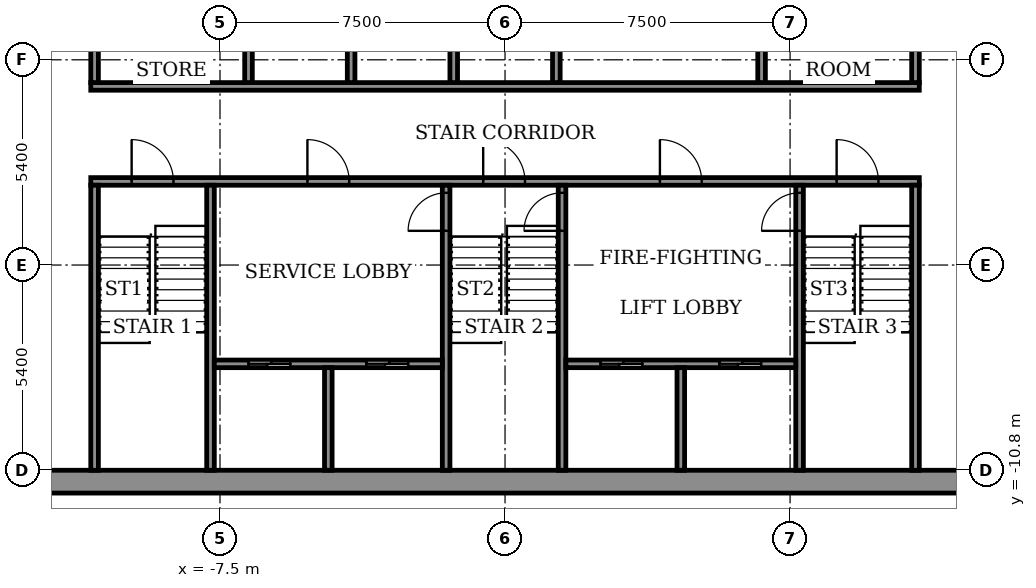
"""IFC4 building model, lengths in metres.
Left out: names, types, materials, properties, quantities, classifications, styles, units other than length and angle.
Written with IfcOpenShell. Run it as: python <this file> out.ifc"""

import sys

from ifc_helpers import new_model, si_unit, direction, frame, frame_2d, origin, place, context, subcontext, project, spatial, rectangle, extrude, element, fill, save


model = new_model("IFC4")
c1 = context("Model", 3, precision=1e-05, world=origin(), true_north=direction((0.0, 1.0)))
c2 = subcontext(c1, "Body", "Model", "MODEL_VIEW")
j1 = project(units=[si_unit("LENGTHUNIT", "METRE"), si_unit("PLANEANGLEUNIT", "RADIAN")], contexts=[c1])
p1 = place(None, origin())
s1 = spatial("IfcSite", under=j1, at=p1, CompositionType="ELEMENT")
p2 = place(p1, origin())
s2 = spatial("IfcBuilding", under=s1, at=p2, CompositionType="ELEMENT")
p3 = place(p2, frame((0.0, 0.0, 306.1)))
s3 = spatial("IfcBuildingStorey", under=s2, at=p3, CompositionType="ELEMENT", Elevation=306.1)
p4 = place(p3, frame((-14.4, -11.1, 0.0), z_axis=(0.0, 0.0, 1.0), x_axis=(1.0, 0.0, 0.0)))
e1 = element("IfcWall", 1, at=p4, inside=s3, PredefinedType="SHEAR", context=c2, shape_type="SweptSolid", body=[
    extrude(rectangle(XDim=28.8, YDim=0.6, at=frame_2d((14.4, 0.0))), origin(), (0.0, 0.0, 1.0), 3.6),
])
p5 = place(p3, frame((-10.9, -3.2, 0.0), z_axis=(0.0, 0.0, 1.0), x_axis=(1.0, 0.0, 0.0)))
e2 = element("IfcWall", 2, at=p5, inside=s3, PredefinedType="SHEAR", context=c2, shape_type="SweptSolid", body=[
    extrude(rectangle(XDim=21.8, YDim=0.2, at=frame_2d((10.9, 0.0))), origin(), (0.0, 0.0, 1.0), 3.05),
])
p6 = place(p5, frame((1.075, 0.0, 0.0)))
e3 = element("IfcOpeningElement", 3, at=p6, cuts=e2, PredefinedType="OPENING", context=c2, shape_type="SweptSolid", body=[
    extrude(rectangle(XDim=1.1, YDim=2.1, at=frame_2d((0.55, 1.05))), frame((0.0, 0.11, 0.0), z_axis=(0.0, -1.0, 0.0), x_axis=(1.0, 0.0, 0.0)), (0.0, 0.0, 1.0), 0.22),
])
p7 = place(p5, frame((10.325, 0.0, 0.0)))
e4 = element("IfcOpeningElement", 4, at=p7, cuts=e2, PredefinedType="OPENING", context=c2, shape_type="SweptSolid", body=[
    extrude(rectangle(XDim=1.1, YDim=2.1, at=frame_2d((0.55, 1.05))), frame((0.0, 0.11, 0.0), z_axis=(0.0, -1.0, 0.0), x_axis=(1.0, 0.0, 0.0)), (0.0, 0.0, 1.0), 0.22),
])
p8 = place(p5, frame((19.625, 0.0, 0.0)))
e5 = element("IfcOpeningElement", 5, at=p8, cuts=e2, PredefinedType="OPENING", context=c2, shape_type="SweptSolid", body=[
    extrude(rectangle(XDim=1.1, YDim=2.1, at=frame_2d((0.55, 1.05))), frame((0.0, 0.11, 0.0), z_axis=(0.0, -1.0, 0.0), x_axis=(1.0, 0.0, 0.0)), (0.0, 0.0, 1.0), 0.22),
])
p9 = place(p5, frame((5.7, 0.0, 0.0)))
e6 = element("IfcOpeningElement", 6, at=p9, cuts=e2, PredefinedType="OPENING", context=c2, shape_type="SweptSolid", body=[
    extrude(rectangle(XDim=1.1, YDim=2.1, at=frame_2d((0.55, 1.05))), frame((0.0, 0.11, 0.0), z_axis=(0.0, -1.0, 0.0), x_axis=(1.0, 0.0, 0.0)), (0.0, 0.0, 1.0), 0.22),
])
p10 = place(p5, frame((14.975, 0.0, 0.0)))
e7 = element("IfcOpeningElement", 7, at=p10, cuts=e2, PredefinedType="OPENING", context=c2, shape_type="SweptSolid", body=[
    extrude(rectangle(XDim=1.1, YDim=2.1, at=frame_2d((0.55, 1.05))), frame((0.0, 0.11, 0.0), z_axis=(0.0, -1.0, 0.0), x_axis=(1.0, 0.0, 0.0)), (0.0, 0.0, 1.0), 0.22),
])
p11 = place(p3, frame((-10.9, -0.7, 0.0), z_axis=(0.0, 0.0, 1.0), x_axis=(1.0, 0.0, 0.0)))
e8 = element("IfcWall", 8, at=p11, inside=s3, PredefinedType="SHEAR", context=c2, shape_type="SweptSolid", body=[
    extrude(rectangle(XDim=21.8, YDim=0.2, at=frame_2d((10.9, 0.0))), origin(), (0.0, 0.0, 1.0), 3.05),
])
for number, where, z_axis, x_axis in (
    (9, (-10.8, -10.8, 0.0), (0.0, 0.0, 1.0), (0.0, 1.0, 0.0)),
    (10, (-7.75, -10.8, 0.0), (0.0, 0.0, 1.0), (0.0, 1.0, 0.0)),
):
    element("IfcWall", number, at=place(p3, frame(where, z_axis=z_axis, x_axis=x_axis)), inside=s3, PredefinedType="SHEAR", context=c2, shape_type="SweptSolid", body=[
        extrude(rectangle(XDim=7.5, YDim=0.2, at=frame_2d((3.75, 0.0))), origin(), (0.0, 0.0, 1.0), 3.05),
    ])
p12 = place(p3, frame((-1.55, -10.8, 0.0), z_axis=(0.0, 0.0, 1.0), x_axis=(0.0, 1.0, 0.0)))
e11 = element("IfcWall", 11, at=p12, inside=s3, PredefinedType="SHEAR", context=c2, shape_type="SweptSolid", body=[
    extrude(rectangle(XDim=7.5, YDim=0.2, at=frame_2d((3.75, 0.0))), origin(), (0.0, 0.0, 1.0), 3.05),
])
p13 = place(p12, frame((6.3, 0.0, 0.0)))
e12 = element("IfcOpeningElement", 12, at=p13, cuts=e11, PredefinedType="OPENING", context=c2, shape_type="SweptSolid", body=[
    extrude(rectangle(XDim=1.0, YDim=2.1, at=frame_2d((0.5, 1.05))), frame((0.0, 0.11, 0.0), z_axis=(0.0, -1.0, 0.0), x_axis=(1.0, 0.0, 0.0)), (0.0, 0.0, 1.0), 0.22),
])
p14 = place(p3, frame((1.5, -10.8, 0.0), z_axis=(0.0, 0.0, 1.0), x_axis=(0.0, 1.0, 0.0)))
e13 = element("IfcWall", 13, at=p14, inside=s3, PredefinedType="SHEAR", context=c2, shape_type="SweptSolid", body=[
    extrude(rectangle(XDim=7.5, YDim=0.2, at=frame_2d((3.75, 0.0))), origin(), (0.0, 0.0, 1.0), 3.05),
])
p15 = place(p14, frame((6.3, 0.0, 0.0)))
e14 = element("IfcOpeningElement", 14, at=p15, cuts=e13, PredefinedType="OPENING", context=c2, shape_type="SweptSolid", body=[
    extrude(rectangle(XDim=1.0, YDim=2.1, at=frame_2d((0.5, 1.05))), frame((0.0, 0.11, 0.0), z_axis=(0.0, -1.0, 0.0), x_axis=(1.0, 0.0, 0.0)), (0.0, 0.0, 1.0), 0.22),
])
p16 = place(p3, frame((7.75, -10.8, 0.0), z_axis=(0.0, 0.0, 1.0), x_axis=(0.0, 1.0, 0.0)))
e15 = element("IfcWall", 15, at=p16, inside=s3, PredefinedType="SHEAR", context=c2, shape_type="SweptSolid", body=[
    extrude(rectangle(XDim=7.5, YDim=0.2, at=frame_2d((3.75, 0.0))), origin(), (0.0, 0.0, 1.0), 3.05),
])
p17 = place(p16, frame((6.3, 0.0, 0.0)))
e16 = element("IfcOpeningElement", 16, at=p17, cuts=e15, PredefinedType="OPENING", context=c2, shape_type="SweptSolid", body=[
    extrude(rectangle(XDim=1.0, YDim=2.1, at=frame_2d((0.5, 1.05))), frame((0.0, 0.11, 0.0), z_axis=(0.0, -1.0, 0.0), x_axis=(1.0, 0.0, 0.0)), (0.0, 0.0, 1.0), 0.22),
])
p18 = place(p3, frame((10.8, -10.8, 0.0), z_axis=(0.0, 0.0, 1.0), x_axis=(0.0, 1.0, 0.0)))
e17 = element("IfcWall", 17, at=p18, inside=s3, PredefinedType="SHEAR", context=c2, shape_type="SweptSolid", body=[
    extrude(rectangle(XDim=7.5, YDim=0.2, at=frame_2d((3.75, 0.0))), origin(), (0.0, 0.0, 1.0), 3.05),
])
p19 = place(p3, frame((-7.65, -8.0, 0.0), z_axis=(0.0, 0.0, 1.0), x_axis=(1.0, 0.0, 0.0)))
e18 = element("IfcWall", 18, at=p19, inside=s3, PredefinedType="SHEAR", context=c2, shape_type="SweptSolid", body=[
    extrude(rectangle(XDim=6.0, YDim=0.2, at=frame_2d((3.0, 0.0))), origin(), (0.0, 0.0, 1.0), 3.05),
])
p20 = place(p19, frame((0.9, 0.0, 0.0)))
e19 = element("IfcOpeningElement", 19, at=p20, cuts=e18, PredefinedType="OPENING", context=c2, shape_type="SweptSolid", body=[
    extrude(rectangle(XDim=1.1, YDim=2.1, at=frame_2d((0.55, 1.05))), frame((0.0, 0.11, 0.0), z_axis=(0.0, -1.0, 0.0), x_axis=(1.0, 0.0, 0.0)), (0.0, 0.0, 1.0), 0.22),
])
p21 = place(p19, frame((4.0, 0.0, 0.0)))
e20 = element("IfcOpeningElement", 20, at=p21, cuts=e18, PredefinedType="OPENING", context=c2, shape_type="SweptSolid", body=[
    extrude(rectangle(XDim=1.1, YDim=2.1, at=frame_2d((0.55, 1.05))), frame((0.0, 0.11, 0.0), z_axis=(0.0, -1.0, 0.0), x_axis=(1.0, 0.0, 0.0)), (0.0, 0.0, 1.0), 0.22),
])
p22 = place(p3, frame((-4.65, -10.8, 0.0), z_axis=(0.0, 0.0, 1.0), x_axis=(0.0, 1.0, 0.0)))
e21 = element("IfcWall", 21, at=p22, inside=s3, PredefinedType="SHEAR", context=c2, shape_type="SweptSolid", body=[
    extrude(rectangle(XDim=2.7, YDim=0.2, at=frame_2d((1.35, 0.0))), origin(), (0.0, 0.0, 1.0), 3.05),
])
p23 = place(p3, frame((1.6, -8.0, 0.0), z_axis=(0.0, 0.0, 1.0), x_axis=(1.0, 0.0, 0.0)))
e22 = element("IfcWall", 22, at=p23, inside=s3, PredefinedType="SHEAR", context=c2, shape_type="SweptSolid", body=[
    extrude(rectangle(XDim=6.05, YDim=0.2, at=frame_2d((3.025, 0.0))), origin(), (0.0, 0.0, 1.0), 3.05),
])
p24 = place(p23, frame((0.913, 0.0, 0.0)))
e23 = element("IfcOpeningElement", 23, at=p24, cuts=e22, PredefinedType="OPENING", context=c2, shape_type="SweptSolid", body=[
    extrude(rectangle(XDim=1.1, YDim=2.1, at=frame_2d((0.55, 1.05))), frame((0.0, 0.11, 0.0), z_axis=(0.0, -1.0, 0.0), x_axis=(1.0, 0.0, 0.0)), (0.0, 0.0, 1.0), 0.22),
])
p25 = place(p23, frame((4.038, 0.0, 0.0)))
e24 = element("IfcOpeningElement", 24, at=p25, cuts=e22, PredefinedType="OPENING", context=c2, shape_type="SweptSolid", body=[
    extrude(rectangle(XDim=1.1, YDim=2.1, at=frame_2d((0.55, 1.05))), frame((0.0, 0.11, 0.0), z_axis=(0.0, -1.0, 0.0), x_axis=(1.0, 0.0, 0.0)), (0.0, 0.0, 1.0), 0.22),
])
p26 = place(p3, frame((4.625, -10.8, 0.0), z_axis=(0.0, 0.0, 1.0), x_axis=(0.0, 1.0, 0.0)))
e25 = element("IfcWall", 25, at=p26, inside=s3, PredefinedType="SHEAR", context=c2, shape_type="SweptSolid", body=[
    extrude(rectangle(XDim=2.7, YDim=0.2, at=frame_2d((1.35, 0.0))), origin(), (0.0, 0.0, 1.0), 3.05),
])
p27 = place(p3, frame((-10.8, -0.6, 0.0), z_axis=(0.0, 0.0, 1.0), x_axis=(0.0, 1.0, 0.0)))
e26 = element("IfcWall", 26, at=p27, inside=s3, PredefinedType="STANDARD", context=c2, shape_type="SweptSolid", body=[
    extrude(rectangle(XDim=2.5, YDim=0.2, at=frame_2d((1.25, 0.0))), origin(), (0.0, 0.0, 1.0), 3.05),
])
for number, where, z_axis, x_axis in (
    (27, (-6.75, -0.6, 0.0), (0.0, 0.0, 1.0), (0.0, 1.0, 0.0)),
    (28, (-4.05, -0.6, 0.0), (0.0, 0.0, 1.0), (0.0, 1.0, 0.0)),
    (29, (-1.35, -0.6, 0.0), (0.0, 0.0, 1.0), (0.0, 1.0, 0.0)),
    (30, (1.35, -0.6, 0.0), (0.0, 0.0, 1.0), (0.0, 1.0, 0.0)),
):
    element("IfcWall", number, at=place(p3, frame(where, z_axis=z_axis, x_axis=x_axis)), inside=s3, PredefinedType="SHEAR", context=c2, shape_type="SweptSolid", body=[
        extrude(rectangle(XDim=2.5, YDim=0.2, at=frame_2d((1.25, 0.0))), origin(), (0.0, 0.0, 1.0), 3.05),
    ])
for number, where, z_axis, x_axis in (
    (31, (6.75, -0.6, 0.0), (0.0, 0.0, 1.0), (0.0, 1.0, 0.0)),
    (32, (10.8, -0.6, 0.0), (0.0, 0.0, 1.0), (0.0, 1.0, 0.0)),
):
    element("IfcWall", number, at=place(p3, frame(where, z_axis=z_axis, x_axis=x_axis)), inside=s3, PredefinedType="STANDARD", context=c2, shape_type="SweptSolid", body=[
        extrude(rectangle(XDim=2.5, YDim=0.2, at=frame_2d((1.25, 0.0))), origin(), (0.0, 0.0, 1.0), 3.05),
    ])
p28 = place(p24, origin())
e33 = element("IfcDoor", 33, at=p28, inside=s3, OperationType="SLIDING_TO_LEFT", PredefinedType="DOOR", context=c2, shape_type="SweptSolid", body=[
    extrude(rectangle(XDim=1.1, YDim=2.1, at=frame_2d((0.55, 1.05))), frame((0.0, 0.025, 0.0), z_axis=(0.0, -1.0, 0.0), x_axis=(1.0, 0.0, 0.0)), (0.0, 0.0, 1.0), 0.05),
])
fill(e23, e33)
p29 = place(p20, origin())
e34 = element("IfcDoor", 34, at=p29, inside=s3, OperationType="SLIDING_TO_LEFT", PredefinedType="DOOR", context=c2, shape_type="SweptSolid", body=[
    extrude(rectangle(XDim=1.1, YDim=2.1, at=frame_2d((0.55, 1.05))), frame((0.0, 0.025, 0.0), z_axis=(0.0, -1.0, 0.0), x_axis=(1.0, 0.0, 0.0)), (0.0, 0.0, 1.0), 0.05),
])
fill(e19, e34)
p30 = place(p25, origin())
e35 = element("IfcDoor", 35, at=p30, inside=s3, OperationType="SLIDING_TO_LEFT", PredefinedType="DOOR", context=c2, shape_type="SweptSolid", body=[
    extrude(rectangle(XDim=1.1, YDim=2.1, at=frame_2d((0.55, 1.05))), frame((0.0, 0.025, 0.0), z_axis=(0.0, -1.0, 0.0), x_axis=(1.0, 0.0, 0.0)), (0.0, 0.0, 1.0), 0.05),
])
fill(e24, e35)
p31 = place(p21, origin())
e36 = element("IfcDoor", 36, at=p31, inside=s3, OperationType="SLIDING_TO_LEFT", PredefinedType="DOOR", context=c2, shape_type="SweptSolid", body=[
    extrude(rectangle(XDim=1.1, YDim=2.1, at=frame_2d((0.55, 1.05))), frame((0.0, 0.025, 0.0), z_axis=(0.0, -1.0, 0.0), x_axis=(1.0, 0.0, 0.0)), (0.0, 0.0, 1.0), 0.05),
])
fill(e20, e36)
p32 = place(p6, origin())
e37 = element("IfcDoor", 37, at=p32, inside=s3, OperationType="SINGLE_SWING_RIGHT", PredefinedType="DOOR", context=c2, shape_type="SweptSolid", body=[
    extrude(rectangle(XDim=1.1, YDim=2.1, at=frame_2d((0.55, 1.05))), frame((0.0, 0.025, 0.0), z_axis=(0.0, -1.0, 0.0), x_axis=(1.0, 0.0, 0.0)), (0.0, 0.0, 1.0), 0.05),
])
fill(e3, e37)
p33 = place(p7, origin())
e38 = element("IfcDoor", 38, at=p33, inside=s3, OperationType="SINGLE_SWING_RIGHT", PredefinedType="DOOR", context=c2, shape_type="SweptSolid", body=[
    extrude(rectangle(XDim=1.1, YDim=2.1, at=frame_2d((0.55, 1.05))), frame((0.0, 0.025, 0.0), z_axis=(0.0, -1.0, 0.0), x_axis=(1.0, 0.0, 0.0)), (0.0, 0.0, 1.0), 0.05),
])
fill(e4, e38)
p34 = place(p8, origin())
e39 = element("IfcDoor", 39, at=p34, inside=s3, OperationType="SINGLE_SWING_RIGHT", PredefinedType="DOOR", context=c2, shape_type="SweptSolid", body=[
    extrude(rectangle(XDim=1.1, YDim=2.1, at=frame_2d((0.55, 1.05))), frame((0.0, 0.025, 0.0), z_axis=(0.0, -1.0, 0.0), x_axis=(1.0, 0.0, 0.0)), (0.0, 0.0, 1.0), 0.05),
])
fill(e5, e39)
p35 = place(p9, origin())
e40 = element("IfcDoor", 40, at=p35, inside=s3, OperationType="SINGLE_SWING_LEFT", PredefinedType="DOOR", context=c2, shape_type="SweptSolid", body=[
    extrude(rectangle(XDim=1.1, YDim=2.1, at=frame_2d((0.55, 1.05))), frame((0.0, 0.025, 0.0), z_axis=(0.0, -1.0, 0.0), x_axis=(1.0, 0.0, 0.0)), (0.0, 0.0, 1.0), 0.05),
])
fill(e6, e40)
p36 = place(p10, origin())
e41 = element("IfcDoor", 41, at=p36, inside=s3, OperationType="SINGLE_SWING_LEFT", PredefinedType="DOOR", context=c2, shape_type="SweptSolid", body=[
    extrude(rectangle(XDim=1.1, YDim=2.1, at=frame_2d((0.55, 1.05))), frame((0.0, 0.025, 0.0), z_axis=(0.0, -1.0, 0.0), x_axis=(1.0, 0.0, 0.0)), (0.0, 0.0, 1.0), 0.05),
])
fill(e7, e41)
p37 = place(p13, origin())
e42 = element("IfcDoor", 42, at=p37, inside=s3, OperationType="SINGLE_SWING_RIGHT", PredefinedType="DOOR", context=c2, shape_type="SweptSolid", body=[
    extrude(rectangle(XDim=1.0, YDim=2.1, at=frame_2d((0.5, 1.05))), frame((0.0, 0.025, 0.0), z_axis=(0.0, -1.0, 0.0), x_axis=(1.0, 0.0, 0.0)), (0.0, 0.0, 1.0), 0.05),
])
fill(e12, e42)
p38 = place(p15, origin())
e43 = element("IfcDoor", 43, at=p38, inside=s3, OperationType="SINGLE_SWING_RIGHT", PredefinedType="DOOR", context=c2, shape_type="SweptSolid", body=[
    extrude(rectangle(XDim=1.0, YDim=2.1, at=frame_2d((0.5, 1.05))), frame((0.0, 0.025, 0.0), z_axis=(0.0, -1.0, 0.0), x_axis=(1.0, 0.0, 0.0)), (0.0, 0.0, 1.0), 0.05),
])
fill(e14, e43)
p39 = place(p17, origin())
e44 = element("IfcDoor", 44, at=p39, inside=s3, OperationType="SINGLE_SWING_RIGHT", PredefinedType="DOOR", context=c2, shape_type="SweptSolid", body=[
    extrude(rectangle(XDim=1.0, YDim=2.1, at=frame_2d((0.5, 1.05))), frame((0.0, 0.025, 0.0), z_axis=(0.0, -1.0, 0.0), x_axis=(1.0, 0.0, 0.0)), (0.0, 0.0, 1.0), 0.05),
])
fill(e16, e44)
save(model, sys.argv[1])
